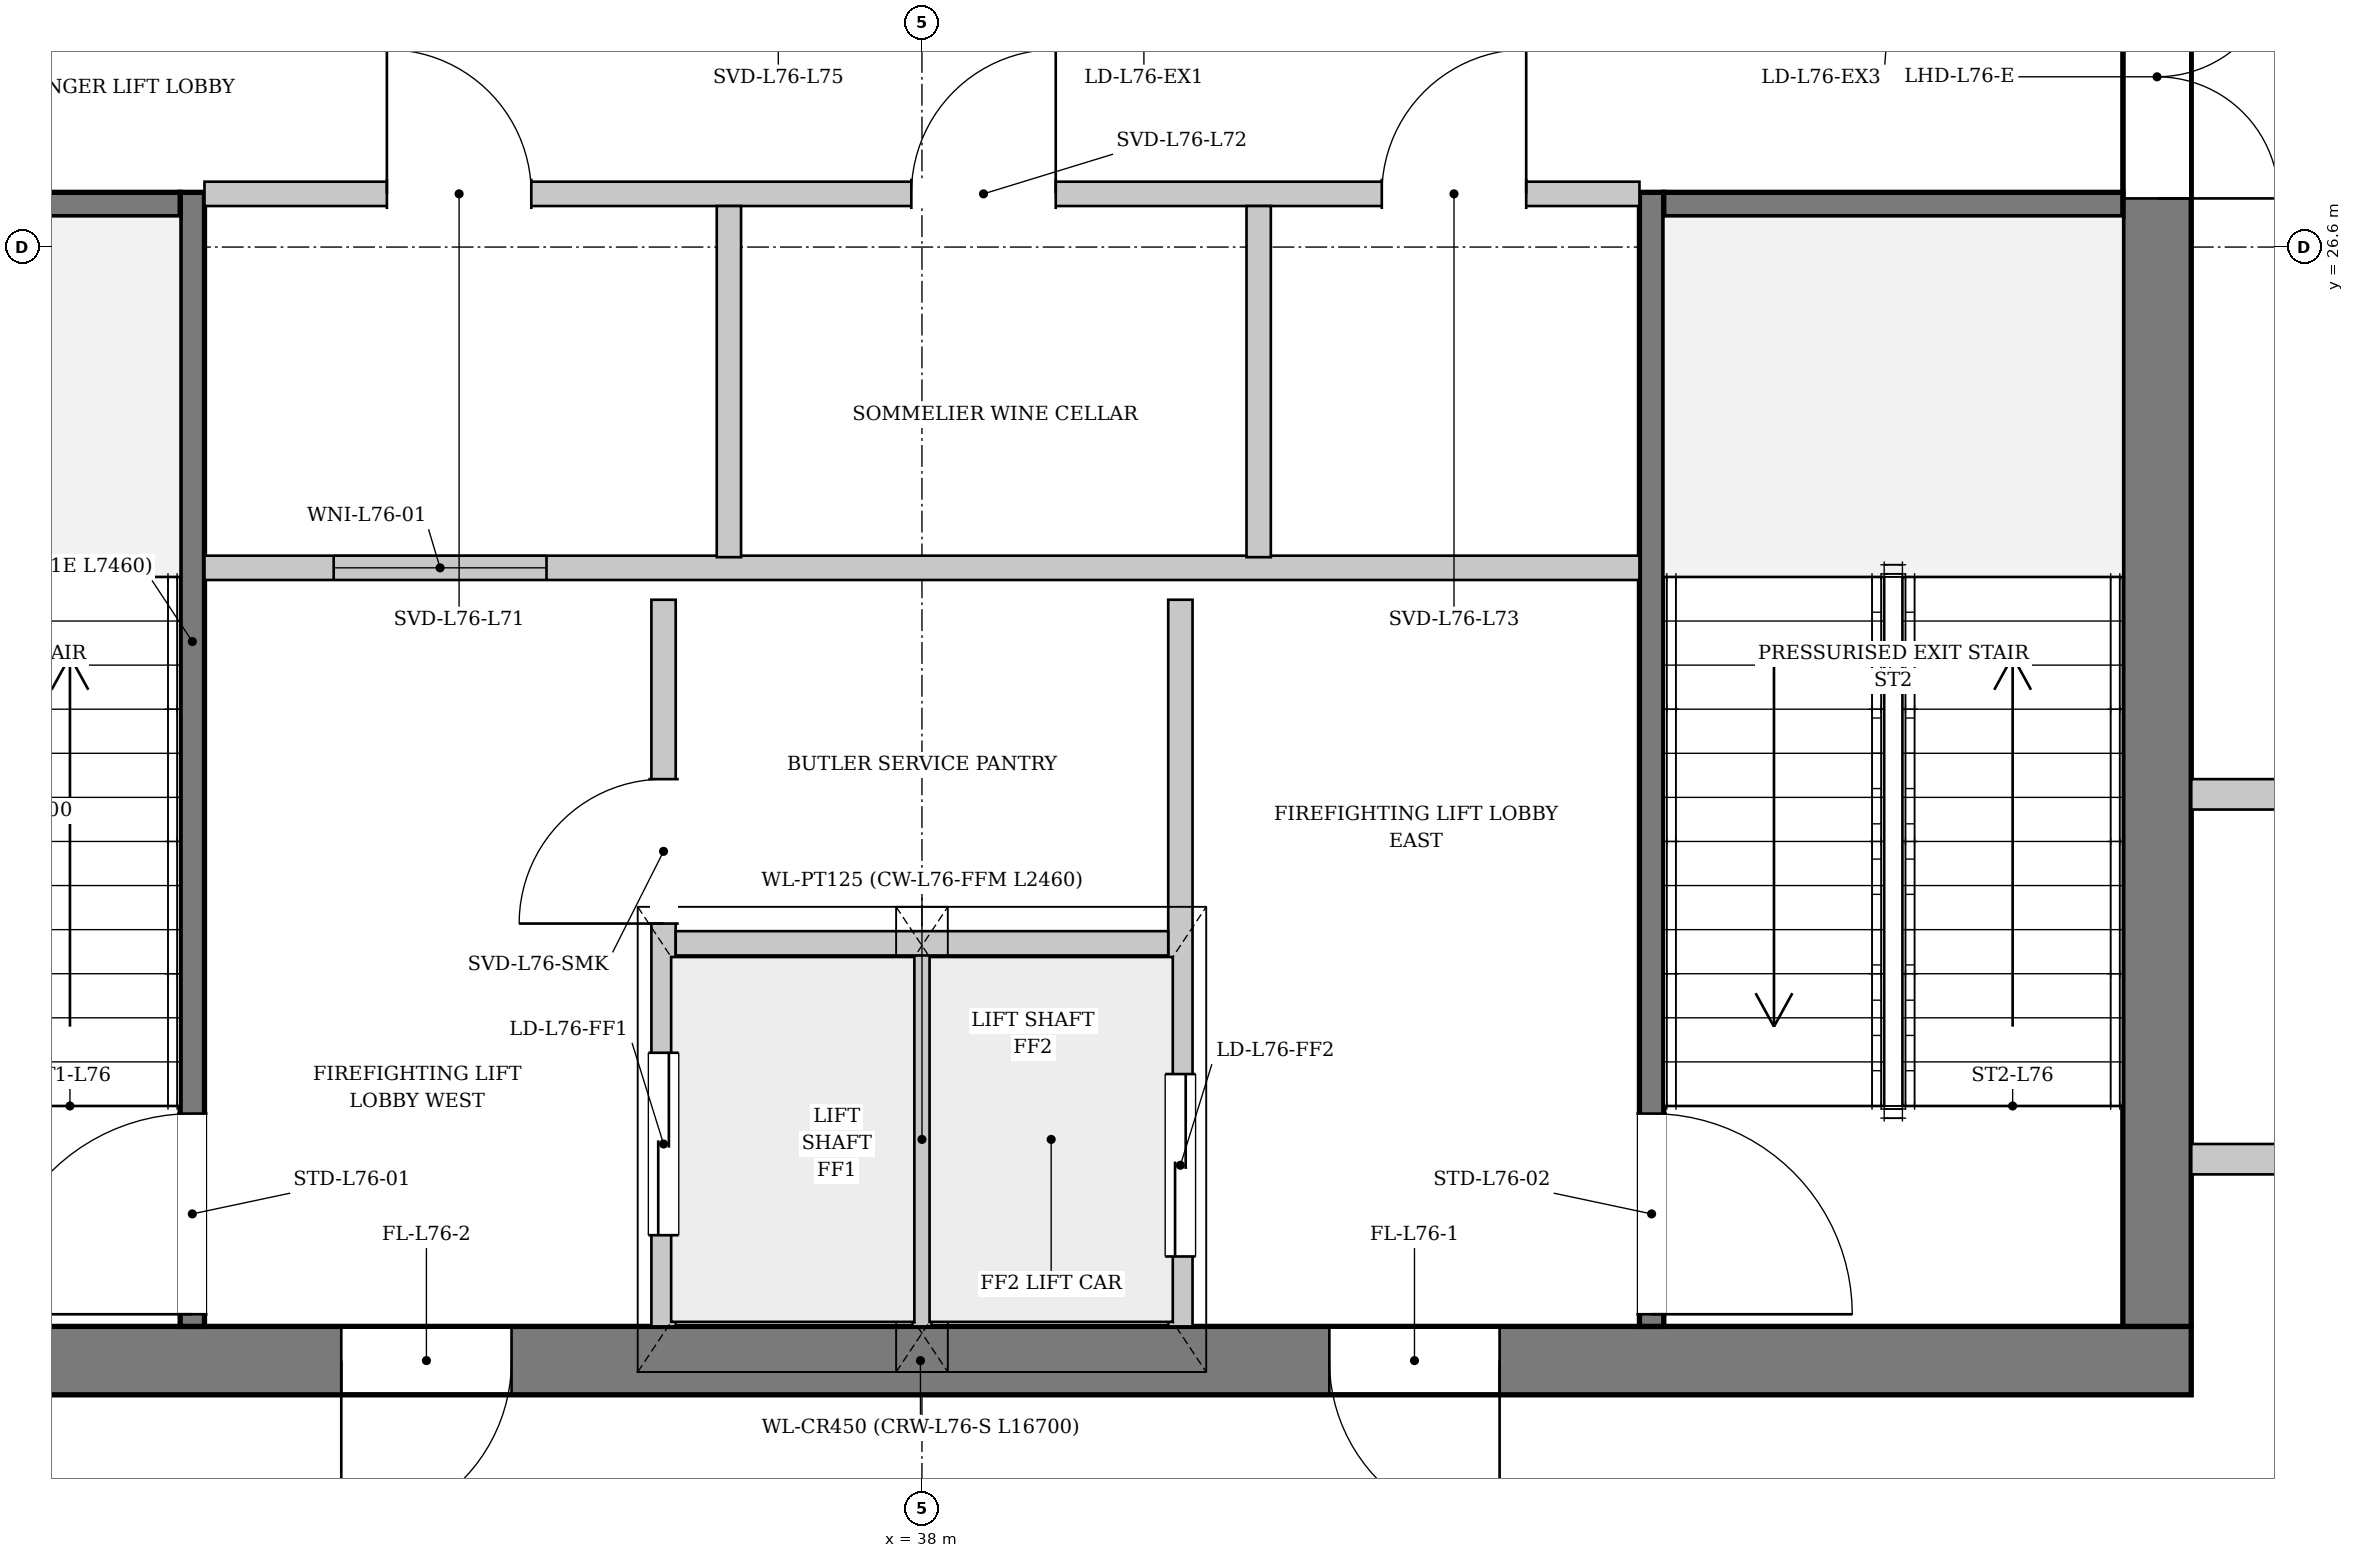
"""IFC4 building model, lengths in metres.
Left out: names, types, materials, properties, quantities, classifications, styles, units other than length and angle.
Written with IfcOpenShell. Run it as: python <this file> out.ifc"""

import sys

from ifc_helpers import new_model, si_unit, direction, frame, frame_2d, origin, place, context, subcontext, project, spatial, rectangle, extrude, source, transform, mapped, element, fill, save


model = new_model("IFC4")
c1 = context("Model", 3, precision=1e-05, world=origin(), true_north=direction((0.0, 1.0)))
c2 = subcontext(c1, "Body", "Model", "MODEL_VIEW")
j1 = project(units=[si_unit("LENGTHUNIT", "METRE"), si_unit("PLANEANGLEUNIT", "RADIAN")], contexts=[c1])
p1 = place(None, origin())
s1 = spatial("IfcSite", under=j1, at=p1, CompositionType="ELEMENT")
p2 = place(p1, origin())
s2 = spatial("IfcBuilding", under=s1, at=p2, CompositionType="ELEMENT")
p3 = place(p2, frame((0.0, 0.0, 286.1)))
s3 = spatial("IfcBuildingStorey", under=s2, at=p3, CompositionType="ELEMENT", Elevation=286.1)
p4 = place(p3, frame((46.35, 19.275, 0.0), z_axis=(0.0, 0.0, 1.0), x_axis=(-1.0, 0.0, 0.0)))
e1 = element("IfcWall", 1, at=p4, inside=s3, PredefinedType="SHEAR", context=c2, shape_type="SweptSolid", body=[
    extrude(rectangle(XDim=16.7, YDim=0.45, at=frame_2d((8.35, 0.0))), origin(), (0.0, 0.0, 1.0), 4.12),
])
p5 = place(p4, frame((4.55, 0.0, 0.0)))
e2 = element("IfcOpeningElement", 2, at=p5, cuts=e1, PredefinedType="OPENING", context=c2, shape_type="SweptSolid", body=[
    extrude(rectangle(XDim=1.12, YDim=2.25, at=frame_2d((0.56, 1.125))), frame((0.0, 0.235, 0.0), z_axis=(0.0, -1.0, 0.0), x_axis=(1.0, 0.0, 0.0)), (0.0, 0.0, 1.0), 0.47),
])
p6 = place(p4, frame((11.05, 0.0, 0.0)))
e3 = element("IfcOpeningElement", 3, at=p6, cuts=e1, PredefinedType="OPENING", context=c2, shape_type="SweptSolid", body=[
    extrude(rectangle(XDim=1.12, YDim=2.25, at=frame_2d((0.56, 1.125))), frame((0.0, 0.235, 0.0), z_axis=(0.0, -1.0, 0.0), x_axis=(1.0, 0.0, 0.0)), (0.0, 0.0, 1.0), 0.47),
])
p7 = place(p3, frame((46.125, 33.7, 0.0), z_axis=(0.0, 0.0, 1.0), x_axis=(0.0, -1.0, 0.0)))
e4 = element("IfcWall", 4, at=p7, inside=s3, PredefinedType="SHEAR", context=c2, shape_type="SweptSolid", body=[
    extrude(rectangle(XDim=14.2, YDim=0.45, at=frame_2d((7.1, 0.0))), origin(), (0.0, 0.0, 1.0), 4.12),
])
p8 = place(p7, frame((5.18, 0.0, 0.0)))
e5 = element("IfcOpeningElement", 5, at=p8, cuts=e4, PredefinedType="OPENING", context=c2, shape_type="SweptSolid", body=[
    extrude(rectangle(XDim=1.6, YDim=2.2, at=frame_2d((0.8, 1.1))), frame((0.0, 0.235, 0.0), z_axis=(0.0, -1.0, 0.0), x_axis=(1.0, 0.0, 0.0)), (0.0, 0.0, 1.0), 0.47),
])
p9 = place(p7, frame((2.05, 0.0, 0.0)))
e6 = element("IfcOpeningElement", 6, at=p9, cuts=e4, PredefinedType="OPENING", context=c2, shape_type="SweptSolid", body=[
    extrude(rectangle(XDim=0.95, YDim=2.1, at=frame_2d((0.475, 1.05))), frame((0.0, 0.235, 0.0), z_axis=(0.0, -1.0, 0.0), x_axis=(1.0, 0.0, 0.0)), (0.0, 0.0, 1.0), 0.47),
])
p10 = place(p3, frame((33.2, 19.5, 0.0), z_axis=(0.0, 0.0, 1.0), x_axis=(0.0, 1.0, 0.0)))
e7 = element("IfcWall", 7, at=p10, inside=s3, PredefinedType="PARTITIONING", context=c2, shape_type="SweptSolid", body=[
    extrude(rectangle(XDim=7.46, YDim=0.16, at=frame_2d((3.73, 0.0))), origin(), (0.0, 0.0, 1.0), 4.12),
])
p11 = place(p10, frame((0.08, 0.0, 0.0)))
e8 = element("IfcOpeningElement", 8, at=p11, cuts=e7, PredefinedType="OPENING", context=c2, shape_type="SweptSolid", body=[
    extrude(rectangle(XDim=1.32, YDim=2.2, at=frame_2d((0.66, 1.1))), frame((0.0, 0.09, 0.0), z_axis=(0.0, -1.0, 0.0), x_axis=(1.0, 0.0, 0.0)), (0.0, 0.0, 1.0), 0.18),
])
p12 = place(p3, frame((30.1, 26.88, 0.0), z_axis=(0.0, 0.0, 1.0), x_axis=(1.0, 0.0, 0.0)))
e9 = element("IfcWall", 9, at=p12, inside=s3, PredefinedType="PARTITIONING", context=c2, shape_type="SweptSolid", body=[
    extrude(rectangle(XDim=3.02, YDim=0.16, at=frame_2d((1.51, 0.0))), origin(), (0.0, 0.0, 1.0), 4.12),
])
p13 = place(p3, frame((42.8, 26.96, 0.0), z_axis=(0.0, 0.0, 1.0), x_axis=(0.0, -1.0, 0.0)))
e10 = element("IfcWall", 10, at=p13, inside=s3, PredefinedType="PARTITIONING", context=c2, shape_type="SweptSolid", body=[
    extrude(rectangle(XDim=7.46, YDim=0.16, at=frame_2d((3.73, 0.0))), origin(), (0.0, 0.0, 1.0), 4.12),
])
p14 = place(p13, frame((6.06, 0.0, 0.0)))
e11 = element("IfcOpeningElement", 11, at=p14, cuts=e10, PredefinedType="OPENING", context=c2, shape_type="SweptSolid", body=[
    extrude(rectangle(XDim=1.32, YDim=2.2, at=frame_2d((0.66, 1.1))), frame((0.0, 0.09, 0.0), z_axis=(0.0, -1.0, 0.0), x_axis=(1.0, 0.0, 0.0)), (0.0, 0.0, 1.0), 0.18),
])
p15 = place(p3, frame((42.88, 26.88, 0.0), z_axis=(0.0, 0.0, 1.0), x_axis=(1.0, 0.0, 0.0)))
e12 = element("IfcWall", 12, at=p15, inside=s3, PredefinedType="PARTITIONING", context=c2, shape_type="SweptSolid", body=[
    extrude(rectangle(XDim=3.02, YDim=0.16, at=frame_2d((1.51, 0.0))), origin(), (0.0, 0.0, 1.0), 4.12),
])
p16 = place(p3, frame((36.3, 19.5, 0.0), z_axis=(0.0, 0.0, 1.0), x_axis=(0.0, 1.0, 0.0)))
e13 = element("IfcWall", 13, at=p16, inside=s3, PredefinedType="PARTITIONING", context=c2, shape_type="SweptSolid", body=[
    extrude(rectangle(XDim=4.78, YDim=0.16, at=frame_2d((2.39, 0.0))), origin(), (0.0, 0.0, 1.0), 4.12),
])
p17 = place(p16, frame((0.6, 0.0, 0.0)))
e14 = element("IfcOpeningElement", 14, at=p17, cuts=e13, PredefinedType="OPENING", context=c2, shape_type="SweptSolid", body=[
    extrude(rectangle(XDim=1.2, YDim=2.2, at=frame_2d((0.6, 1.1))), frame((0.0, 0.09, 0.0), z_axis=(0.0, -1.0, 0.0), x_axis=(1.0, 0.0, 0.0)), (0.0, 0.0, 1.0), 0.18),
])
p18 = place(p16, frame((2.65, 0.0, 0.0)))
e15 = element("IfcOpeningElement", 15, at=p18, cuts=e13, PredefinedType="OPENING", context=c2, shape_type="SweptSolid", body=[
    extrude(rectangle(XDim=0.95, YDim=2.1, at=frame_2d((0.475, 1.05))), frame((0.0, 0.09, 0.0), z_axis=(0.0, -1.0, 0.0), x_axis=(1.0, 0.0, 0.0)), (0.0, 0.0, 1.0), 0.18),
])
p19 = place(p3, frame((39.7, 24.28, 0.0), z_axis=(0.0, 0.0, 1.0), x_axis=(0.0, -1.0, 0.0)))
e16 = element("IfcWall", 16, at=p19, inside=s3, PredefinedType="PARTITIONING", context=c2, shape_type="SweptSolid", body=[
    extrude(rectangle(XDim=4.78, YDim=0.16, at=frame_2d((2.39, 0.0))), origin(), (0.0, 0.0, 1.0), 4.12),
])
p20 = place(p19, frame((3.12, 0.0, 0.0)))
e17 = element("IfcOpeningElement", 17, at=p20, cuts=e16, PredefinedType="OPENING", context=c2, shape_type="SweptSolid", body=[
    extrude(rectangle(XDim=1.2, YDim=2.2, at=frame_2d((0.6, 1.1))), frame((0.0, 0.09, 0.0), z_axis=(0.0, -1.0, 0.0), x_axis=(1.0, 0.0, 0.0)), (0.0, 0.0, 1.0), 0.18),
])
p21 = place(p3, frame((38.0, 19.5, 0.0), z_axis=(0.0, 0.0, 1.0), x_axis=(0.0, 1.0, 0.0)))
e18 = element("IfcWall", 18, at=p21, inside=s3, PredefinedType="PARTITIONING", context=c2, shape_type="SweptSolid", body=[
    extrude(rectangle(XDim=2.46, YDim=0.125, at=frame_2d((1.23, 0.0))), origin(), (0.0, 0.0, 1.0), 4.12),
])
p22 = place(p3, frame((36.38, 22.02, 0.0), z_axis=(0.0, 0.0, 1.0), x_axis=(1.0, 0.0, 0.0)))
e19 = element("IfcWall", 19, at=p22, inside=s3, PredefinedType="PARTITIONING", context=c2, shape_type="SweptSolid", body=[
    extrude(rectangle(XDim=3.24, YDim=0.16, at=frame_2d((1.62, 0.0))), origin(), (0.0, 0.0, 1.0), 4.12),
])
p23 = place(p3, frame((33.28, 24.49, 0.0), z_axis=(0.0, 0.0, 1.0), x_axis=(1.0, 0.0, 0.0)))
e20 = element("IfcWall", 20, at=p23, inside=s3, PredefinedType="PARTITIONING", context=c2, shape_type="SweptSolid", body=[
    extrude(rectangle(XDim=9.44, YDim=0.16, at=frame_2d((4.72, 0.0))), origin(), (0.0, 0.0, 1.0), 4.12),
])
p24 = place(p23, frame((0.85, 0.0, 0.95)))
e21 = element("IfcOpeningElement", 21, at=p24, cuts=e20, PredefinedType="OPENING", context=c2, shape_type="SweptSolid", body=[
    extrude(rectangle(XDim=1.4, YDim=1.8, at=frame_2d((0.7, 0.9))), frame((0.0, 0.09, 0.0), z_axis=(0.0, -1.0, 0.0), x_axis=(1.0, 0.0, 0.0)), (0.0, 0.0, 1.0), 0.18),
])
p25 = place(p3, frame((33.28, 26.95, 0.0), z_axis=(0.0, 0.0, 1.0), x_axis=(1.0, 0.0, 0.0)))
e22 = element("IfcWall", 22, at=p25, inside=s3, PredefinedType="PARTITIONING", context=c2, shape_type="SweptSolid", body=[
    extrude(rectangle(XDim=9.44, YDim=0.16, at=frame_2d((4.72, 0.0))), origin(), (0.0, 0.0, 1.0), 4.12),
])
p26 = place(p25, frame((1.2, 0.0, 0.0)))
e23 = element("IfcOpeningElement", 23, at=p26, cuts=e22, PredefinedType="OPENING", context=c2, shape_type="SweptSolid", body=[
    extrude(rectangle(XDim=0.95, YDim=2.1, at=frame_2d((0.475, 1.05))), frame((0.0, 0.09, 0.0), z_axis=(0.0, -1.0, 0.0), x_axis=(1.0, 0.0, 0.0)), (0.0, 0.0, 1.0), 0.18),
])
p27 = place(p25, frame((4.65, 0.0, 0.0)))
e24 = element("IfcOpeningElement", 24, at=p27, cuts=e22, PredefinedType="OPENING", context=c2, shape_type="SweptSolid", body=[
    extrude(rectangle(XDim=0.95, YDim=2.1, at=frame_2d((0.475, 1.05))), frame((0.0, 0.09, 0.0), z_axis=(0.0, -1.0, 0.0), x_axis=(1.0, 0.0, 0.0)), (0.0, 0.0, 1.0), 0.18),
])
p28 = place(p25, frame((7.745, 0.0, 0.0)))
e25 = element("IfcOpeningElement", 25, at=p28, cuts=e22, PredefinedType="OPENING", context=c2, shape_type="SweptSolid", body=[
    extrude(rectangle(XDim=0.95, YDim=2.1, at=frame_2d((0.475, 1.05))), frame((0.0, 0.09, 0.0), z_axis=(0.0, -1.0, 0.0), x_axis=(1.0, 0.0, 0.0)), (0.0, 0.0, 1.0), 0.18),
])
for number, where, z_axis, x_axis in (
    (26, (36.73, 24.56, 0.0), (0.0, 0.0, 1.0), (0.0, 1.0, 0.0)),
    (27, (40.215, 24.56, 0.0), (0.0, 0.0, 1.0), (0.0, 1.0, 0.0)),
):
    element("IfcWall", number, at=place(p3, frame(where, z_axis=z_axis, x_axis=x_axis)), inside=s3, PredefinedType="PARTITIONING", context=c2, shape_type="SweptSolid", body=[
        extrude(rectangle(XDim=2.31, YDim=0.16, at=frame_2d((1.155, 0.0))), origin(), (0.0, 0.0, 1.0), 4.12),
    ])
for number, where, z_axis, x_axis in (
    (28, (46.35, 20.6, 0.0), (0.0, 0.0, 1.0), (1.0, 0.0, 0.0)),
    (29, (46.35, 23.0, 0.0), (0.0, 0.0, 1.0), (1.0, 0.0, 0.0)),
):
    element("IfcWall", number, at=place(p3, frame(where, z_axis=z_axis, x_axis=x_axis)), inside=s3, PredefinedType="PARTITIONING", context=c2, shape_type="SweptSolid", body=[
        extrude(rectangle(XDim=1.85, YDim=0.2, at=frame_2d((0.925, 0.0))), origin(), (0.0, 0.0, 1.0), 4.12),
    ])
m1 = source(origin(), c2, "Body", "SweptSolid", [
    extrude(rectangle(XDim=1.12, YDim=2.25, at=frame_2d((0.56, 1.125))), frame((0.0, 0.025, 0.0), z_axis=(0.0, -1.0, 0.0), x_axis=(1.0, 0.0, 0.0)), (0.0, 0.0, 1.0), 0.05),
])
p29 = place(p5, origin())
e30 = element("IfcDoor", 30, at=p29, inside=s3, OperationType="SINGLE_SWING_LEFT", PredefinedType="DOOR", context=c2, shape_type="MappedRepresentation", body=[
    mapped(m1, transform((0.0, 0.0, 0.0), x_axis=(1.0, 0.0, 0.0), y_axis=(0.0, 1.0, 0.0), z_axis=(0.0, 0.0, 1.0), scale=1.0)),
])
fill(e2, e30)
p30 = place(p6, origin())
e31 = element("IfcDoor", 31, at=p30, inside=s3, OperationType="SINGLE_SWING_RIGHT", PredefinedType="DOOR", context=c2, shape_type="MappedRepresentation", body=[
    mapped(m1, transform((0.0, 0.0, 0.0), x_axis=(1.0, 0.0, 0.0), y_axis=(0.0, 1.0, 0.0), z_axis=(0.0, 0.0, 1.0), scale=1.0)),
])
fill(e3, e31)
m2 = source(origin(), c2, "Body", "SweptSolid", [
    extrude(rectangle(XDim=1.6, YDim=2.2, at=frame_2d((0.8, 1.1))), frame((0.0, 0.025, 0.0), z_axis=(0.0, -1.0, 0.0), x_axis=(1.0, 0.0, 0.0)), (0.0, 0.0, 1.0), 0.05),
])
p31 = place(p8, origin())
e32 = element("IfcDoor", 32, at=p31, inside=s3, OperationType="DOUBLE_DOOR_SINGLE_SWING", PredefinedType="DOOR", context=c2, shape_type="MappedRepresentation", body=[
    mapped(m2, transform((0.0, 0.0, 0.0), x_axis=(1.0, 0.0, 0.0), y_axis=(0.0, 1.0, 0.0), z_axis=(0.0, 0.0, 1.0), scale=1.0)),
])
fill(e5, e32)
m3 = source(origin(), c2, "Body", "SweptSolid", [
    extrude(rectangle(XDim=1.32, YDim=2.2, at=frame_2d((0.66, 1.1))), frame((0.0, 0.025, 0.0), z_axis=(0.0, -1.0, 0.0), x_axis=(1.0, 0.0, 0.0)), (0.0, 0.0, 1.0), 0.05),
])
p32 = place(p11, origin())
e33 = element("IfcDoor", 33, at=p32, inside=s3, OperationType="SINGLE_SWING_LEFT", PredefinedType="DOOR", context=c2, shape_type="MappedRepresentation", body=[
    mapped(m3, transform((0.0, 0.0, 0.0), x_axis=(1.0, 0.0, 0.0), y_axis=(0.0, 1.0, 0.0), z_axis=(0.0, 0.0, 1.0), scale=1.0)),
])
fill(e8, e33)
p33 = place(p14, origin())
e34 = element("IfcDoor", 34, at=p33, inside=s3, OperationType="SINGLE_SWING_RIGHT", PredefinedType="DOOR", context=c2, shape_type="MappedRepresentation", body=[
    mapped(m3, transform((0.0, 0.0, 0.0), x_axis=(1.0, 0.0, 0.0), y_axis=(0.0, 1.0, 0.0), z_axis=(0.0, 0.0, 1.0), scale=1.0)),
])
fill(e11, e34)
m4 = source(origin(), c2, "Body", "SweptSolid", [
    extrude(rectangle(XDim=1.2, YDim=2.2, at=frame_2d((0.6, 1.1))), frame((0.0, 0.025, 0.0), z_axis=(0.0, -1.0, 0.0), x_axis=(1.0, 0.0, 0.0)), (0.0, 0.0, 1.0), 0.05),
])
p34 = place(p17, origin())
e35 = element("IfcDoor", 35, at=p34, inside=s3, OperationType="DOUBLE_DOOR_SLIDING", PredefinedType="DOOR", context=c2, shape_type="MappedRepresentation", body=[
    mapped(m4, transform((0.0, 0.0, 0.0), x_axis=(1.0, 0.0, 0.0), y_axis=(0.0, 1.0, 0.0), z_axis=(0.0, 0.0, 1.0), scale=1.0)),
])
fill(e14, e35)
m5 = source(origin(), c2, "Body", "SweptSolid", [
    extrude(rectangle(XDim=0.95, YDim=2.1, at=frame_2d((0.475, 1.05))), frame((0.0, 0.025, 0.0), z_axis=(0.0, -1.0, 0.0), x_axis=(1.0, 0.0, 0.0)), (0.0, 0.0, 1.0), 0.05),
])
p35 = place(p18, origin())
e36 = element("IfcDoor", 36, at=p35, inside=s3, OperationType="SINGLE_SWING_LEFT", PredefinedType="DOOR", context=c2, shape_type="MappedRepresentation", body=[
    mapped(m5, transform((0.0, 0.0, 0.0), x_axis=(1.0, 0.0, 0.0), y_axis=(0.0, 1.0, 0.0), z_axis=(0.0, 0.0, 1.0), scale=1.0)),
])
fill(e15, e36)
p36 = place(p20, origin())
e37 = element("IfcDoor", 37, at=p36, inside=s3, OperationType="DOUBLE_DOOR_SLIDING", PredefinedType="DOOR", context=c2, shape_type="MappedRepresentation", body=[
    mapped(m4, transform((0.0, 0.0, 0.0), x_axis=(1.0, 0.0, 0.0), y_axis=(0.0, 1.0, 0.0), z_axis=(0.0, 0.0, 1.0), scale=1.0)),
])
fill(e17, e37)
p37 = place(p26, origin())
e38 = element("IfcDoor", 38, at=p37, inside=s3, OperationType="SINGLE_SWING_LEFT", PredefinedType="DOOR", context=c2, shape_type="MappedRepresentation", body=[
    mapped(m5, transform((0.0, 0.0, 0.0), x_axis=(1.0, 0.0, 0.0), y_axis=(0.0, 1.0, 0.0), z_axis=(0.0, 0.0, 1.0), scale=1.0)),
])
fill(e23, e38)
p38 = place(p27, origin())
e39 = element("IfcDoor", 39, at=p38, inside=s3, OperationType="SINGLE_SWING_RIGHT", PredefinedType="DOOR", context=c2, shape_type="MappedRepresentation", body=[
    mapped(m5, transform((0.0, 0.0, 0.0), x_axis=(1.0, 0.0, 0.0), y_axis=(0.0, 1.0, 0.0), z_axis=(0.0, 0.0, 1.0), scale=1.0)),
])
fill(e24, e39)
p39 = place(p28, origin())
e40 = element("IfcDoor", 40, at=p39, inside=s3, OperationType="SINGLE_SWING_RIGHT", PredefinedType="DOOR", context=c2, shape_type="MappedRepresentation", body=[
    mapped(m5, transform((0.0, 0.0, 0.0), x_axis=(1.0, 0.0, 0.0), y_axis=(0.0, 1.0, 0.0), z_axis=(0.0, 0.0, 1.0), scale=1.0)),
])
fill(e25, e40)
m6 = source(origin(), c2, "Body", "SweptSolid", [
    extrude(rectangle(XDim=1.4, YDim=1.8, at=frame_2d((0.7, 0.9))), frame((0.0, 0.03, 0.0), z_axis=(0.0, -1.0, 0.0), x_axis=(1.0, 0.0, 0.0)), (0.0, 0.0, 1.0), 0.06),
])
p40 = place(p24, origin())
e41 = element("IfcWindow", 41, at=p40, inside=s3, PartitioningType="SINGLE_PANEL", PredefinedType="WINDOW", context=c2, shape_type="MappedRepresentation", body=[
    mapped(m6, transform((0.0, 0.0, 0.0), x_axis=(1.0, 0.0, 0.0), y_axis=(0.0, 1.0, 0.0), z_axis=(0.0, 0.0, 1.0), scale=1.0)),
])
fill(e21, e41)
save(model, sys.argv[1])
